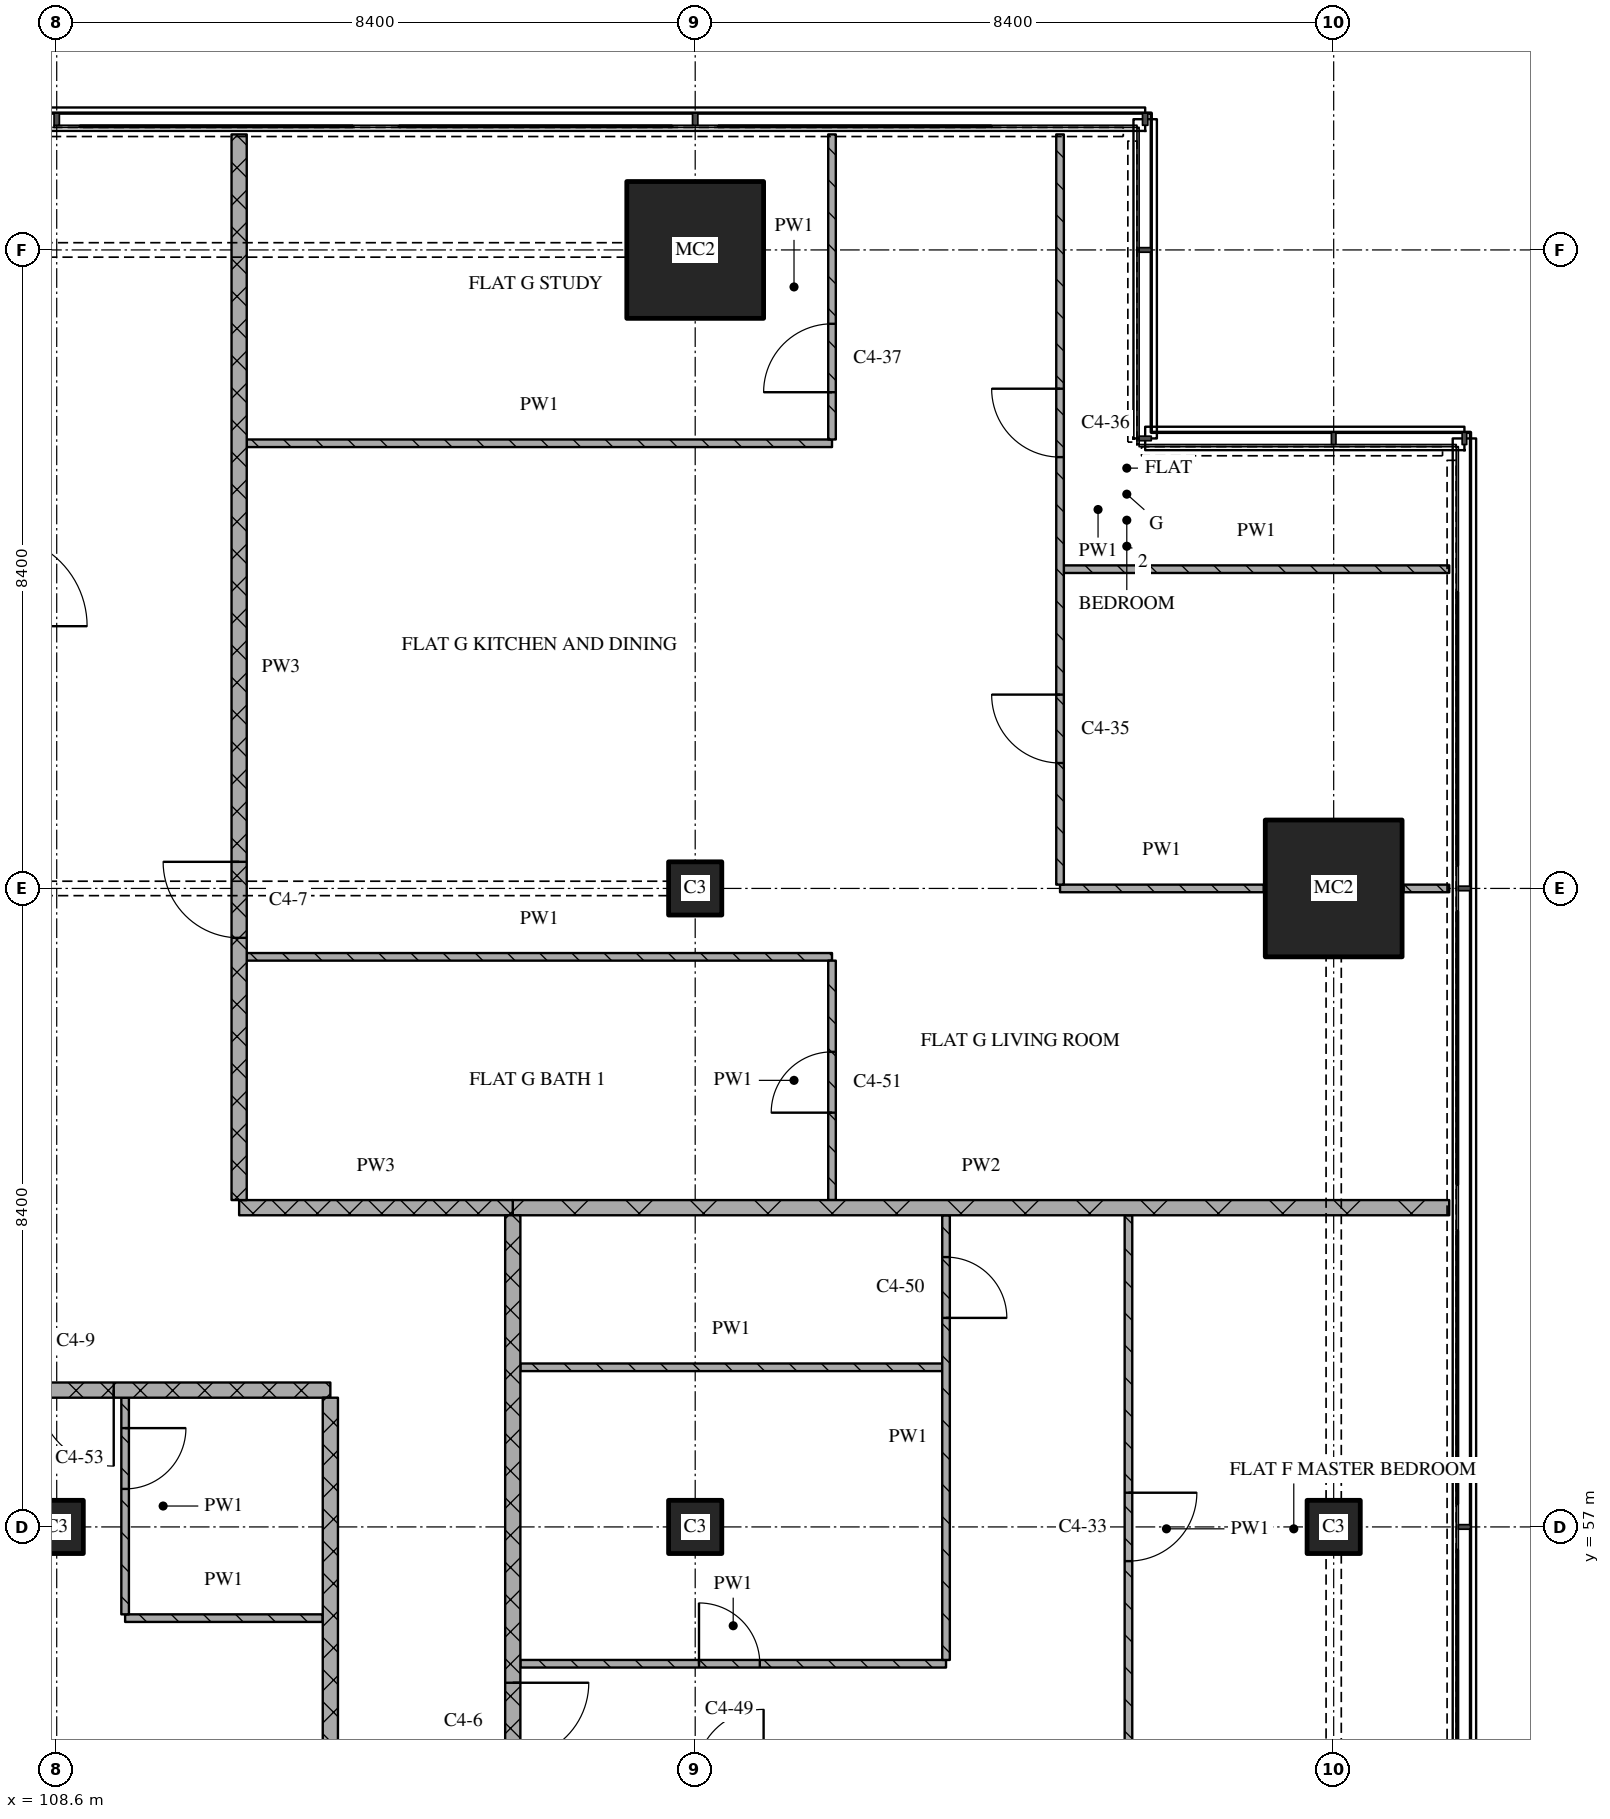
"""IFC4 building model, lengths in metres.
Left out: names, types, materials, properties, quantities, classifications, styles, units other than length and angle.
Written with IfcOpenShell. Run it as: python <this file> out.ifc"""

import sys

from ifc_helpers import new_model, si_unit, direction, frame, frame_2d, origin, origin_2d, place, context, subcontext, project, spatial, rectangle, extrude, element, fill, save


model = new_model("IFC4")
c1 = context("Model", 3, precision=1e-05, world=origin(), true_north=direction((0.0, 1.0)))
c2 = subcontext(c1, "Body", "Model", "MODEL_VIEW")
j1 = project(units=[si_unit("LENGTHUNIT", "METRE"), si_unit("PLANEANGLEUNIT", "RADIAN")], contexts=[c1])
p1 = place(None, origin())
s1 = spatial("IfcSite", under=j1, at=p1, CompositionType="ELEMENT")
p2 = place(p1, origin())
s2 = spatial("IfcBuilding", under=s1, at=p2, CompositionType="ELEMENT")
p3 = place(p2, frame((0.0, 0.0, 179.85)))
s3 = spatial("IfcBuildingStorey", under=s2, at=p3, CompositionType="ELEMENT", Elevation=179.85)
for number, where, z_axis, x_axis in (
    (1, (108.6, 57.0, 0.0), (0.0, 0.0, 1.0), (1.0, 0.0, 0.0)),
    (2, (117.0, 57.0, 0.0), (0.0, 0.0, 1.0), (1.0, 0.0, 0.0)),
    (3, (117.0, 65.4, 0.0), (0.0, 0.0, 1.0), (1.0, 0.0, 0.0)),
):
    element("IfcColumn", number, at=place(p3, frame(where, z_axis=z_axis, x_axis=x_axis)), inside=s3, PredefinedType="COLUMN", context=c2, shape_type="SweptSolid", body=[
        extrude(rectangle(XDim=0.7, YDim=0.7, at=origin_2d()), origin(), (0.0, 0.0, 1.0), 3.6),
    ])
p4 = place(p3, frame((117.0, 73.8, 0.0), z_axis=(0.0, 0.0, 1.0), x_axis=(1.0, 0.0, 0.0)))
e4 = element("IfcColumn", 4, at=p4, inside=s3, PredefinedType="COLUMN", context=c2, shape_type="SweptSolid", body=[
    extrude(rectangle(XDim=1.8, YDim=1.8, at=origin_2d()), origin(), (0.0, 0.0, 1.0), 3.6),
])
p5 = place(p3, frame((125.4, 57.0, 0.0), z_axis=(0.0, 0.0, 1.0), x_axis=(1.0, 0.0, 0.0)))
e5 = element("IfcColumn", 5, at=p5, inside=s3, PredefinedType="COLUMN", context=c2, shape_type="SweptSolid", body=[
    extrude(rectangle(XDim=0.7, YDim=0.7, at=origin_2d()), origin(), (0.0, 0.0, 1.0), 3.6),
])
p6 = place(p3, frame((125.4, 65.4, 0.0), z_axis=(0.0, 0.0, 1.0), x_axis=(1.0, 0.0, 0.0)))
e6 = element("IfcColumn", 6, at=p6, inside=s3, PredefinedType="COLUMN", context=c2, shape_type="SweptSolid", body=[
    extrude(rectangle(XDim=1.8, YDim=1.8, at=origin_2d()), origin(), (0.0, 0.0, 1.0), 3.6),
])
p7 = place(p3, frame((114.7, 55.2, 0.0), z_axis=(0.0, 0.0, 1.0), x_axis=(1.0, 0.0, 0.0)))
e7 = element("IfcWall", 7, at=p7, inside=s3, PredefinedType="PARTITIONING", context=c2, shape_type="SweptSolid", body=[
    extrude(rectangle(XDim=5.6, YDim=0.1, at=frame_2d((2.8, 0.0))), origin(), (0.0, 0.0, 1.0), 3.32),
])
p8 = place(p7, frame((2.35, 0.0, 0.0)))
e8 = element("IfcOpeningElement", 8, at=p8, cuts=e7, PredefinedType="OPENING", context=c2, shape_type="SweptSolid", body=[
    extrude(rectangle(XDim=0.8, YDim=2.1, at=frame_2d((0.4, 1.05))), frame((0.0, 0.06, 0.0), z_axis=(0.0, -1.0, 0.0), x_axis=(1.0, 0.0, 0.0)), (0.0, 0.0, 1.0), 0.12),
])
p9 = place(p3, frame((109.5, 55.8, 0.0), z_axis=(0.0, 0.0, 1.0), x_axis=(1.0, 0.0, 0.0)))
e9 = element("IfcWall", 9, at=p9, inside=s3, PredefinedType="PARTITIONING", context=c2, shape_type="SweptSolid", body=[
    extrude(rectangle(XDim=2.6, YDim=0.1, at=frame_2d((1.3, 0.0))), origin(), (0.0, 0.0, 1.0), 3.32),
])
p10 = place(p3, frame((112.2, 58.8, 0.0), z_axis=(0.0, 0.0, 1.0), x_axis=(-1.0, 0.0, 0.0)))
e10 = element("IfcWall", 10, at=p10, inside=s3, PredefinedType="PARTITIONING", context=c2, shape_type="SweptSolid", body=[
    extrude(rectangle(XDim=10.8, YDim=0.2, at=frame_2d((5.4, 0.0))), origin(), (0.0, 0.0, 1.0), 3.32),
])
p11 = place(p10, frame((2.85, 0.0, 0.0)))
e11 = element("IfcOpeningElement", 11, at=p11, cuts=e10, PredefinedType="OPENING", context=c2, shape_type="SweptSolid", body=[
    extrude(rectangle(XDim=1.0, YDim=2.1, at=frame_2d((0.5, 1.05))), frame((0.0, 0.11, 0.0), z_axis=(0.0, -1.0, 0.0), x_axis=(1.0, 0.0, 0.0)), (0.0, 0.0, 1.0), 0.22),
])
p12 = place(p3, frame((114.7, 59.1, 0.0), z_axis=(0.0, 0.0, 1.0), x_axis=(1.0, 0.0, 0.0)))
e12 = element("IfcWall", 12, at=p12, inside=s3, PredefinedType="PARTITIONING", context=c2, shape_type="SweptSolid", body=[
    extrude(rectangle(XDim=5.55, YDim=0.1, at=frame_2d((2.775, 0.0))), origin(), (0.0, 0.0, 1.0), 3.32),
])
p13 = place(p3, frame((111.0, 61.2, 0.0), z_axis=(0.0, 0.0, 1.0), x_axis=(1.0, 0.0, 0.0)))
e13 = element("IfcWall", 13, at=p13, inside=s3, PredefinedType="PARTITIONING", context=c2, shape_type="SweptSolid", body=[
    extrude(rectangle(XDim=3.6, YDim=0.2, at=frame_2d((1.8, 0.0))), origin(), (0.0, 0.0, 1.0), 3.32),
])
p14 = place(p3, frame((114.6, 61.2, 0.0), z_axis=(0.0, 0.0, 1.0), x_axis=(1.0, 0.0, 0.0)))
e14 = element("IfcWall", 14, at=p14, inside=s3, PredefinedType="PARTITIONING", context=c2, shape_type="SweptSolid", body=[
    extrude(rectangle(XDim=12.32, YDim=0.2, at=frame_2d((6.16, 0.0))), origin(), (0.0, 0.0, 1.0), 3.32),
])
p15 = place(p3, frame((111.1, 64.5, 0.0), z_axis=(0.0, 0.0, 1.0), x_axis=(1.0, 0.0, 0.0)))
e15 = element("IfcWall", 15, at=p15, inside=s3, PredefinedType="PARTITIONING", context=c2, shape_type="SweptSolid", body=[
    extrude(rectangle(XDim=7.7, YDim=0.1, at=frame_2d((3.85, 0.0))), origin(), (0.0, 0.0, 1.0), 3.32),
])
p16 = place(p3, frame((121.8, 65.4, 0.0), z_axis=(0.0, 0.0, 1.0), x_axis=(1.0, 0.0, 0.0)))
e16 = element("IfcWall", 16, at=p16, inside=s3, PredefinedType="PARTITIONING", context=c2, shape_type="SweptSolid", body=[
    extrude(rectangle(XDim=2.68, YDim=0.1, at=frame_2d((1.34, 0.0))), origin(), (0.0, 0.0, 1.0), 3.32),
])
p17 = place(p3, frame((126.32, 65.4, 0.0), z_axis=(0.0, 0.0, 1.0), x_axis=(1.0, 0.0, 0.0)))
e17 = element("IfcWall", 17, at=p17, inside=s3, PredefinedType="PARTITIONING", context=c2, shape_type="SweptSolid", body=[
    extrude(rectangle(XDim=0.6, YDim=0.1, at=frame_2d((0.3, 0.0))), origin(), (0.0, 0.0, 1.0), 3.32),
])
p18 = place(p3, frame((121.85, 69.6, 0.0), z_axis=(0.0, 0.0, 1.0), x_axis=(1.0, 0.0, 0.0)))
e18 = element("IfcWall", 18, at=p18, inside=s3, PredefinedType="PARTITIONING", context=c2, shape_type="SweptSolid", body=[
    extrude(rectangle(XDim=5.07, YDim=0.1, at=frame_2d((2.535, 0.0))), origin(), (0.0, 0.0, 1.0), 3.32),
])
p19 = place(p3, frame((111.1, 71.256, 0.0), z_axis=(0.0, 0.0, 1.0), x_axis=(1.0, 0.0, 0.0)))
e19 = element("IfcWall", 19, at=p19, inside=s3, PredefinedType="PARTITIONING", context=c2, shape_type="SweptSolid", body=[
    extrude(rectangle(XDim=7.7, YDim=0.1, at=frame_2d((3.85, 0.0))), origin(), (0.0, 0.0, 1.0), 3.32),
])
p20 = place(p3, frame((109.5, 58.7, 0.0), z_axis=(0.0, 0.0, 1.0), x_axis=(0.0, -1.0, 0.0)))
e20 = element("IfcWall", 20, at=p20, inside=s3, PredefinedType="PARTITIONING", context=c2, shape_type="SweptSolid", body=[
    extrude(rectangle(XDim=2.85, YDim=0.1, at=frame_2d((1.425, 0.0))), origin(), (0.0, 0.0, 1.0), 3.32),
])
p21 = place(p20, frame((0.4, 0.0, 0.0)))
e21 = element("IfcOpeningElement", 21, at=p21, cuts=e20, PredefinedType="OPENING", context=c2, shape_type="SweptSolid", body=[
    extrude(rectangle(XDim=0.8, YDim=2.1, at=frame_2d((0.4, 1.05))), frame((0.0, 0.06, 0.0), z_axis=(0.0, -1.0, 0.0), x_axis=(1.0, 0.0, 0.0)), (0.0, 0.0, 1.0), 0.12),
])
p22 = place(p3, frame((111.0, 75.32, 0.0), z_axis=(0.0, 0.0, 1.0), x_axis=(0.0, -1.0, 0.0)))
e22 = element("IfcWall", 22, at=p22, inside=s3, PredefinedType="PARTITIONING", context=c2, shape_type="SweptSolid", body=[
    extrude(rectangle(XDim=14.02, YDim=0.2, at=frame_2d((7.01, 0.0))), origin(), (0.0, 0.0, 1.0), 3.32),
])
p23 = place(p22, frame((9.57, 0.0, 0.0)))
e23 = element("IfcOpeningElement", 23, at=p23, cuts=e22, PredefinedType="OPENING", context=c2, shape_type="SweptSolid", body=[
    extrude(rectangle(XDim=1.0, YDim=2.1, at=frame_2d((0.5, 1.05))), frame((0.0, 0.11, 0.0), z_axis=(0.0, -1.0, 0.0), x_axis=(1.0, 0.0, 0.0)), (0.0, 0.0, 1.0), 0.22),
])
p24 = place(p3, frame((112.2, 58.7, 0.0), z_axis=(0.0, 0.0, 1.0), x_axis=(0.0, -1.0, 0.0)))
e24 = element("IfcWall", 24, at=p24, inside=s3, PredefinedType="PARTITIONING", context=c2, shape_type="SweptSolid", body=[
    extrude(rectangle(XDim=15.4, YDim=0.2, at=frame_2d((7.7, 0.0))), origin(), (0.0, 0.0, 1.0), 3.32),
])
p25 = place(p3, frame((114.6, 61.1, 0.0), z_axis=(0.0, 0.0, 1.0), x_axis=(0.0, -1.0, 0.0)))
e25 = element("IfcWall", 25, at=p25, inside=s3, PredefinedType="PARTITIONING", context=c2, shape_type="SweptSolid", body=[
    extrude(rectangle(XDim=17.8, YDim=0.2, at=frame_2d((8.9, 0.0))), origin(), (0.0, 0.0, 1.0), 3.32),
])
p26 = place(p25, frame((6.15, 0.0, 0.0)))
e26 = element("IfcOpeningElement", 26, at=p26, cuts=e25, PredefinedType="OPENING", context=c2, shape_type="SweptSolid", body=[
    extrude(rectangle(XDim=1.0, YDim=2.1, at=frame_2d((0.5, 1.05))), frame((0.0, 0.11, 0.0), z_axis=(0.0, -1.0, 0.0), x_axis=(1.0, 0.0, 0.0)), (0.0, 0.0, 1.0), 0.22),
])
p27 = place(p3, frame((118.8, 61.3, 0.0), z_axis=(0.0, 0.0, 1.0), x_axis=(0.0, 1.0, 0.0)))
e27 = element("IfcWall", 27, at=p27, inside=s3, PredefinedType="PARTITIONING", context=c2, shape_type="SweptSolid", body=[
    extrude(rectangle(XDim=3.15, YDim=0.1, at=frame_2d((1.575, 0.0))), origin(), (0.0, 0.0, 1.0), 3.32),
])
p28 = place(p27, frame((1.15, 0.0, 0.0)))
e28 = element("IfcOpeningElement", 28, at=p28, cuts=e27, PredefinedType="OPENING", context=c2, shape_type="SweptSolid", body=[
    extrude(rectangle(XDim=0.8, YDim=2.1, at=frame_2d((0.4, 1.05))), frame((0.0, 0.06, 0.0), z_axis=(0.0, -1.0, 0.0), x_axis=(1.0, 0.0, 0.0)), (0.0, 0.0, 1.0), 0.12),
])
p29 = place(p3, frame((118.8, 71.306, 0.0), z_axis=(0.0, 0.0, 1.0), x_axis=(0.0, 1.0, 0.0)))
e29 = element("IfcWall", 29, at=p29, inside=s3, PredefinedType="PARTITIONING", context=c2, shape_type="SweptSolid", body=[
    extrude(rectangle(XDim=4.014, YDim=0.1, at=frame_2d((2.007, 0.0))), origin(), (0.0, 0.0, 1.0), 3.32),
])
p30 = place(p29, frame((0.622, 0.0, 0.0)))
e30 = element("IfcOpeningElement", 30, at=p30, cuts=e29, PredefinedType="OPENING", context=c2, shape_type="SweptSolid", body=[
    extrude(rectangle(XDim=0.9, YDim=2.1, at=frame_2d((0.45, 1.05))), frame((0.0, 0.06, 0.0), z_axis=(0.0, -1.0, 0.0), x_axis=(1.0, 0.0, 0.0)), (0.0, 0.0, 1.0), 0.12),
])
p31 = place(p3, frame((120.3, 55.25, 0.0), z_axis=(0.0, 0.0, 1.0), x_axis=(0.0, 1.0, 0.0)))
e31 = element("IfcWall", 31, at=p31, inside=s3, PredefinedType="PARTITIONING", context=c2, shape_type="SweptSolid", body=[
    extrude(rectangle(XDim=5.85, YDim=0.1, at=frame_2d((2.925, 0.0))), origin(), (0.0, 0.0, 1.0), 3.32),
])
p32 = place(p31, frame((4.5, 0.0, 0.0)))
e32 = element("IfcOpeningElement", 32, at=p32, cuts=e31, PredefinedType="OPENING", context=c2, shape_type="SweptSolid", body=[
    extrude(rectangle(XDim=0.8, YDim=2.1, at=frame_2d((0.4, 1.05))), frame((0.0, 0.06, 0.0), z_axis=(0.0, -1.0, 0.0), x_axis=(1.0, 0.0, 0.0)), (0.0, 0.0, 1.0), 0.12),
])
p33 = place(p3, frame((121.8, 75.32, 0.0), z_axis=(0.0, 0.0, 1.0), x_axis=(0.0, -1.0, 0.0)))
e33 = element("IfcWall", 33, at=p33, inside=s3, PredefinedType="PARTITIONING", context=c2, shape_type="SweptSolid", body=[
    extrude(rectangle(XDim=9.87, YDim=0.1, at=frame_2d((4.935, 0.0))), origin(), (0.0, 0.0, 1.0), 3.32),
])
p34 = place(p33, frame((3.346, 0.0, 0.0)))
e34 = element("IfcOpeningElement", 34, at=p34, cuts=e33, PredefinedType="OPENING", context=c2, shape_type="SweptSolid", body=[
    extrude(rectangle(XDim=0.9, YDim=2.1, at=frame_2d((0.45, 1.05))), frame((0.0, 0.06, 0.0), z_axis=(0.0, -1.0, 0.0), x_axis=(1.0, 0.0, 0.0)), (0.0, 0.0, 1.0), 0.12),
])
p35 = place(p33, frame((7.37, 0.0, 0.0)))
e35 = element("IfcOpeningElement", 35, at=p35, cuts=e33, PredefinedType="OPENING", context=c2, shape_type="SweptSolid", body=[
    extrude(rectangle(XDim=0.9, YDim=2.1, at=frame_2d((0.45, 1.05))), frame((0.0, 0.06, 0.0), z_axis=(0.0, -1.0, 0.0), x_axis=(1.0, 0.0, 0.0)), (0.0, 0.0, 1.0), 0.12),
])
p36 = place(p3, frame((122.7, 61.1, 0.0), z_axis=(0.0, 0.0, 1.0), x_axis=(0.0, -1.0, 0.0)))
e36 = element("IfcWall", 36, at=p36, inside=s3, PredefinedType="PARTITIONING", context=c2, shape_type="SweptSolid", body=[
    extrude(rectangle(XDim=8.25, YDim=0.1, at=frame_2d((4.125, 0.0))), origin(), (0.0, 0.0, 1.0), 3.32),
])
p37 = place(p36, frame((3.65, 0.0, 0.0)))
e37 = element("IfcOpeningElement", 37, at=p37, cuts=e36, PredefinedType="OPENING", context=c2, shape_type="SweptSolid", body=[
    extrude(rectangle(XDim=0.9, YDim=2.1, at=frame_2d((0.45, 1.05))), frame((0.0, 0.06, 0.0), z_axis=(0.0, -1.0, 0.0), x_axis=(1.0, 0.0, 0.0)), (0.0, 0.0, 1.0), 0.12),
])
p38 = place(p8, origin())
e38 = element("IfcDoor", 38, at=p38, inside=s3, OperationType="SINGLE_SWING_LEFT", PredefinedType="DOOR", context=c2, shape_type="SweptSolid", body=[
    extrude(rectangle(XDim=0.8, YDim=2.1, at=frame_2d((0.4, 1.05))), frame((0.0, 0.025, 0.0), z_axis=(0.0, -1.0, 0.0), x_axis=(1.0, 0.0, 0.0)), (0.0, 0.0, 1.0), 0.05),
])
fill(e8, e38)
p39 = place(p11, origin())
e39 = element("IfcDoor", 39, at=p39, inside=s3, OperationType="SINGLE_SWING_LEFT", PredefinedType="DOOR", context=c2, shape_type="SweptSolid", body=[
    extrude(rectangle(XDim=1.0, YDim=2.1, at=frame_2d((0.5, 1.05))), frame((0.0, 0.025, 0.0), z_axis=(0.0, -1.0, 0.0), x_axis=(1.0, 0.0, 0.0)), (0.0, 0.0, 1.0), 0.05),
])
fill(e11, e39)
p40 = place(p21, origin())
e40 = element("IfcDoor", 40, at=p40, inside=s3, OperationType="SINGLE_SWING_LEFT", PredefinedType="DOOR", context=c2, shape_type="SweptSolid", body=[
    extrude(rectangle(XDim=0.8, YDim=2.1, at=frame_2d((0.4, 1.05))), frame((0.0, 0.025, 0.0), z_axis=(0.0, -1.0, 0.0), x_axis=(1.0, 0.0, 0.0)), (0.0, 0.0, 1.0), 0.05),
])
fill(e21, e40)
p41 = place(p23, origin())
e41 = element("IfcDoor", 41, at=p41, inside=s3, OperationType="SINGLE_SWING_RIGHT", PredefinedType="DOOR", context=c2, shape_type="SweptSolid", body=[
    extrude(rectangle(XDim=1.0, YDim=2.1, at=frame_2d((0.5, 1.05))), frame((0.0, 0.025, 0.0), z_axis=(0.0, -1.0, 0.0), x_axis=(1.0, 0.0, 0.0)), (0.0, 0.0, 1.0), 0.05),
])
fill(e23, e41)
p42 = place(p26, origin())
e42 = element("IfcDoor", 42, at=p42, inside=s3, OperationType="SINGLE_SWING_LEFT", PredefinedType="DOOR", context=c2, shape_type="SweptSolid", body=[
    extrude(rectangle(XDim=1.0, YDim=2.1, at=frame_2d((0.5, 1.05))), frame((0.0, 0.025, 0.0), z_axis=(0.0, -1.0, 0.0), x_axis=(1.0, 0.0, 0.0)), (0.0, 0.0, 1.0), 0.05),
])
fill(e26, e42)
p43 = place(p28, origin())
e43 = element("IfcDoor", 43, at=p43, inside=s3, OperationType="SINGLE_SWING_LEFT", PredefinedType="DOOR", context=c2, shape_type="SweptSolid", body=[
    extrude(rectangle(XDim=0.8, YDim=2.1, at=frame_2d((0.4, 1.05))), frame((0.0, 0.025, 0.0), z_axis=(0.0, -1.0, 0.0), x_axis=(1.0, 0.0, 0.0)), (0.0, 0.0, 1.0), 0.05),
])
fill(e28, e43)
p44 = place(p30, origin())
e44 = element("IfcDoor", 44, at=p44, inside=s3, OperationType="SINGLE_SWING_LEFT", PredefinedType="DOOR", context=c2, shape_type="SweptSolid", body=[
    extrude(rectangle(XDim=0.9, YDim=2.1, at=frame_2d((0.45, 1.05))), frame((0.0, 0.025, 0.0), z_axis=(0.0, -1.0, 0.0), x_axis=(1.0, 0.0, 0.0)), (0.0, 0.0, 1.0), 0.05),
])
fill(e30, e44)
p45 = place(p32, origin())
e45 = element("IfcDoor", 45, at=p45, inside=s3, OperationType="SINGLE_SWING_RIGHT", PredefinedType="DOOR", context=c2, shape_type="SweptSolid", body=[
    extrude(rectangle(XDim=0.8, YDim=2.1, at=frame_2d((0.4, 1.05))), frame((0.0, 0.025, 0.0), z_axis=(0.0, -1.0, 0.0), x_axis=(1.0, 0.0, 0.0)), (0.0, 0.0, 1.0), 0.05),
])
fill(e32, e45)
p46 = place(p34, origin())
e46 = element("IfcDoor", 46, at=p46, inside=s3, OperationType="SINGLE_SWING_RIGHT", PredefinedType="DOOR", context=c2, shape_type="SweptSolid", body=[
    extrude(rectangle(XDim=0.9, YDim=2.1, at=frame_2d((0.45, 1.05))), frame((0.0, 0.025, 0.0), z_axis=(0.0, -1.0, 0.0), x_axis=(1.0, 0.0, 0.0)), (0.0, 0.0, 1.0), 0.05),
])
fill(e34, e46)
p47 = place(p35, origin())
e47 = element("IfcDoor", 47, at=p47, inside=s3, OperationType="SINGLE_SWING_RIGHT", PredefinedType="DOOR", context=c2, shape_type="SweptSolid", body=[
    extrude(rectangle(XDim=0.9, YDim=2.1, at=frame_2d((0.45, 1.05))), frame((0.0, 0.025, 0.0), z_axis=(0.0, -1.0, 0.0), x_axis=(1.0, 0.0, 0.0)), (0.0, 0.0, 1.0), 0.05),
])
fill(e35, e47)
p48 = place(p37, origin())
e48 = element("IfcDoor", 48, at=p48, inside=s3, OperationType="SINGLE_SWING_LEFT", PredefinedType="DOOR", context=c2, shape_type="SweptSolid", body=[
    extrude(rectangle(XDim=0.9, YDim=2.1, at=frame_2d((0.45, 1.05))), frame((0.0, 0.025, 0.0), z_axis=(0.0, -1.0, 0.0), x_axis=(1.0, 0.0, 0.0)), (0.0, 0.0, 1.0), 0.05),
])
fill(e37, e48)
save(model, sys.argv[1])
